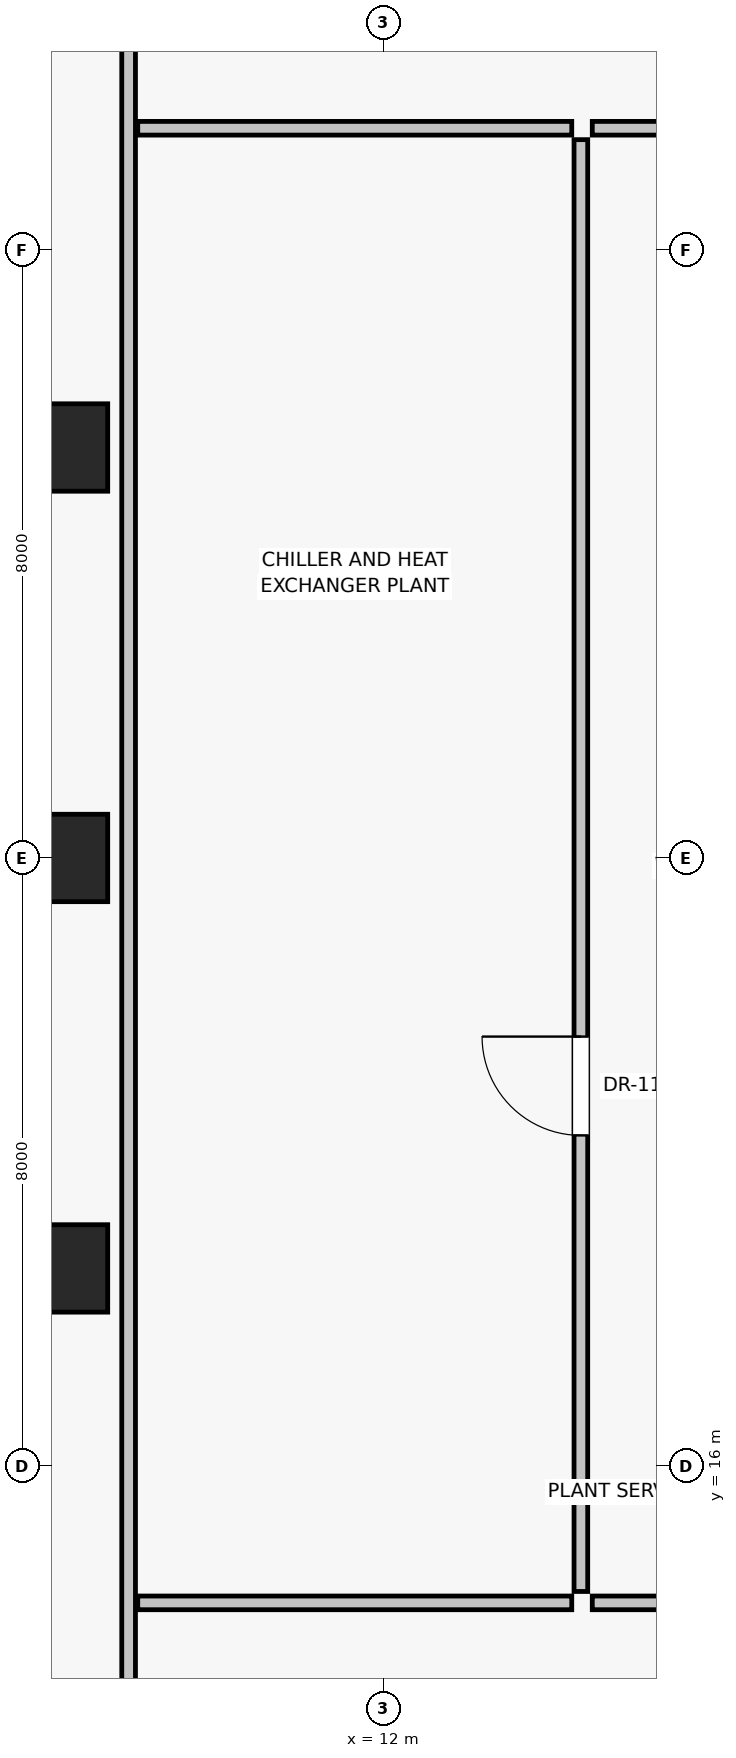
"""IFC4 building model, lengths in metres.
Left out: names, types, materials, properties, quantities, classifications, styles, units other than length and angle.
Written with IfcOpenShell. Run it as: python <this file> out.ifc"""

import sys

from ifc_helpers import new_model, si_unit, direction, frame, frame_2d, origin, origin_2d, place, context, subcontext, project, spatial, rectangle, extrude, source, transform, mapped, element, fill, save


model = new_model("IFC4")
c1 = context("Model", 3, precision=1e-05, world=origin(), true_north=direction((0.0, 1.0)))
c2 = subcontext(c1, "Body", "Model", "MODEL_VIEW")
j1 = project(units=[si_unit("LENGTHUNIT", "METRE"), si_unit("PLANEANGLEUNIT", "RADIAN")], contexts=[c1])
p1 = place(None, origin())
s1 = spatial("IfcSite", under=j1, at=p1, CompositionType="ELEMENT")
p2 = place(p1, origin())
s2 = spatial("IfcBuilding", under=s1, at=p2, CompositionType="ELEMENT")
p3 = place(p2, frame((0.0, 0.0, 169.55)))
s3 = spatial("IfcBuildingStorey", under=s2, at=p3, CompositionType="ELEMENT", Elevation=169.55)
for number, where, z_axis, x_axis in (
    (1, (7.8, 29.4, 0.0), (0.0, 0.0, 1.0), (1.0, 0.0, 0.0)),
    (2, (7.8, 24.0, 0.0), (0.0, 0.0, 1.0), (1.0, 0.0, 0.0)),
    (3, (7.8, 18.6, 0.0), (0.0, 0.0, 1.0), (1.0, 0.0, 0.0)),
):
    element("IfcColumn", number, at=place(p3, frame(where, z_axis=z_axis, x_axis=x_axis)), inside=s3, PredefinedType="COLUMN", context=c2, shape_type="SweptSolid", body=[
        extrude(rectangle(XDim=1.15, YDim=1.15, at=origin_2d()), origin(), (0.0, 0.0, 1.0), 4.8),
    ])
p4 = place(p3, frame((14.75, 14.2, 0.0), z_axis=(0.0, 0.0, 1.0), x_axis=(1.0, 0.0, 0.0)))
e4 = element("IfcWall", 4, at=p4, inside=s3, PredefinedType="PARTITIONING", context=c2, shape_type="SweptSolid", body=[
    extrude(rectangle(XDim=18.5, YDim=0.18, at=frame_2d((9.25, 0.0))), origin(), (0.0, 0.0, 1.0), 4.48),
])
p5 = place(p4, frame((6.0, 0.0, 0.0)))
e5 = element("IfcOpeningElement", 5, at=p5, cuts=e4, PredefinedType="OPENING", context=c2, shape_type="SweptSolid", body=[
    extrude(rectangle(XDim=1.1, YDim=2.03, at=frame_2d((0.55, 1.015))), frame((0.0, 0.1, 0.0), z_axis=(0.0, -1.0, 0.0), x_axis=(1.0, 0.0, 0.0)), (0.0, 0.0, 1.0), 0.2),
])
p6 = place(p3, frame((14.75, 33.6, 0.0), z_axis=(0.0, 0.0, 1.0), x_axis=(1.0, 0.0, 0.0)))
e6 = element("IfcWall", 6, at=p6, inside=s3, PredefinedType="PARTITIONING", context=c2, shape_type="SweptSolid", body=[
    extrude(rectangle(XDim=18.5, YDim=0.18, at=frame_2d((9.25, 0.0))), origin(), (0.0, 0.0, 1.0), 4.48),
])
p7 = place(p6, frame((6.0, 0.0, 0.0)))
e7 = element("IfcOpeningElement", 7, at=p7, cuts=e6, PredefinedType="OPENING", context=c2, shape_type="SweptSolid", body=[
    extrude(rectangle(XDim=1.1, YDim=2.03, at=frame_2d((0.55, 1.015))), frame((0.0, 0.1, 0.0), z_axis=(0.0, -1.0, 0.0), x_axis=(1.0, 0.0, 0.0)), (0.0, 0.0, 1.0), 0.2),
])
p8 = place(p3, frame((14.6, 14.35, 0.0), z_axis=(0.0, 0.0, 1.0), x_axis=(0.0, 1.0, 0.0)))
e8 = element("IfcWall", 8, at=p8, inside=s3, PredefinedType="PARTITIONING", context=c2, shape_type="SweptSolid", body=[
    extrude(rectangle(XDim=19.1, YDim=0.18, at=frame_2d((9.55, 0.0))), origin(), (0.0, 0.0, 1.0), 4.48),
])
p9 = place(p8, frame((6.0, 0.0, 0.0)))
e9 = element("IfcOpeningElement", 9, at=p9, cuts=e8, PredefinedType="OPENING", context=c2, shape_type="SweptSolid", body=[
    extrude(rectangle(XDim=1.3, YDim=2.3, at=frame_2d((0.65, 1.15))), frame((0.0, 0.1, 0.0), z_axis=(0.0, -1.0, 0.0), x_axis=(1.0, 0.0, 0.0)), (0.0, 0.0, 1.0), 0.2),
])
p10 = place(p3, frame((8.65, 8.77, 0.0), z_axis=(0.0, 0.0, 1.0), x_axis=(0.0, 1.0, 0.0)))
e10 = element("IfcWall", 10, at=p10, inside=s3, PredefinedType="PARTITIONING", context=c2, shape_type="SweptSolid", body=[
    extrude(rectangle(XDim=30.46, YDim=0.18, at=frame_2d((15.23, 0.0))), origin(), (0.0, 0.0, 1.0), 2.28),
])
for number, where, z_axis, x_axis in (
    (11, (8.77, 14.2, 0.0), (0.0, 0.0, 1.0), (1.0, 0.0, 0.0)),
    (12, (8.77, 33.6, 0.0), (0.0, 0.0, 1.0), (1.0, 0.0, 0.0)),
):
    element("IfcWall", number, at=place(p3, frame(where, z_axis=z_axis, x_axis=x_axis)), inside=s3, PredefinedType="PARTITIONING", context=c2, shape_type="SweptSolid", body=[
        extrude(rectangle(XDim=5.71, YDim=0.18, at=frame_2d((2.855, 0.0))), origin(), (0.0, 0.0, 1.0), 4.48),
    ])
m1 = source(origin(), c2, "Body", "SweptSolid", [
    extrude(rectangle(XDim=1.3, YDim=2.3, at=frame_2d((0.65, 1.15))), frame((0.0, 0.025, 0.0), z_axis=(0.0, -1.0, 0.0), x_axis=(1.0, 0.0, 0.0)), (0.0, 0.0, 1.0), 0.05),
])
p11 = place(p9, origin())
e13 = element("IfcDoor", 13, at=p11, inside=s3, OperationType="SINGLE_SWING_RIGHT", PredefinedType="DOOR", context=c2, shape_type="MappedRepresentation", body=[
    mapped(m1, transform((0.0, 0.0, 0.0), scale=1.0)),
])
fill(e9, e13)
save(model, sys.argv[1])
